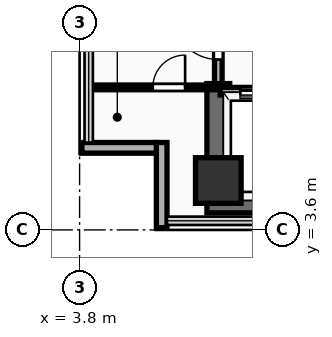
"""IFC4 building model, lengths in metres.
Left out: names, types, materials, properties, quantities, classifications, styles, units other than length and angle.
Written with IfcOpenShell. Run it as: python <this file> out.ifc"""

import sys

from ifc_helpers import new_model, si_unit, direction, frame, frame_2d, origin, origin_2d, place, context, subcontext, project, spatial, rectangle, extrude, element, fill, save


model = new_model("IFC4")
c1 = context("Model", 3, precision=1e-05, world=origin(), true_north=direction((0.0, 1.0)))
c2 = subcontext(c1, "Body", "Model", "MODEL_VIEW")
j1 = project(units=[si_unit("LENGTHUNIT", "METRE"), si_unit("PLANEANGLEUNIT", "RADIAN")], contexts=[c1])
p1 = place(None, origin())
s1 = spatial("IfcSite", under=j1, at=p1, CompositionType="ELEMENT")
p2 = place(p1, origin())
s2 = spatial("IfcBuilding", under=s1, at=p2, CompositionType="ELEMENT")
p3 = place(p2, frame((0.0, 0.0, 191.8)))
s3 = spatial("IfcBuildingStorey", under=s2, at=p3, CompositionType="ELEMENT", Elevation=191.8)
p4 = place(p3, frame((7.15, 4.35, 0.0), z_axis=(0.0, 0.0, 1.0), x_axis=(1.0, 0.0, 0.0)))
e1 = element("IfcWall", 1, at=p4, inside=s3, PredefinedType="SHEAR", context=c2, shape_type="SweptSolid", body=[
    extrude(rectangle(XDim=13.95, YDim=0.6, at=frame_2d((6.975, 0.0))), origin(), (0.0, 0.0, 1.0), 3.56),
])
p5 = place(p3, frame((7.45, 4.65, 0.0), z_axis=(0.0, 0.0, 1.0), x_axis=(0.0, 1.0, 0.0)))
e2 = element("IfcWall", 2, at=p5, inside=s3, PredefinedType="SHEAR", context=c2, shape_type="SweptSolid", body=[
    extrude(rectangle(XDim=2.8, YDim=0.6, at=frame_2d((1.4, 0.0))), origin(), (0.0, 0.0, 1.0), 3.56),
])
p6 = place(p3, frame((7.45, 4.9, 0.0), z_axis=(0.0, 0.0, 1.0), x_axis=(1.0, 0.0, 0.0)))
e3 = element("IfcColumn", 3, at=p6, inside=s3, PredefinedType="COLUMN", context=c2, shape_type="SweptSolid", body=[
    extrude(rectangle(XDim=1.2, YDim=1.2, at=origin_2d()), origin(), (0.0, 0.0, 1.0), 3.56),
])
p7 = place(p3, frame((5.96, 3.66, 0.0), z_axis=(0.0, 0.0, 1.0), x_axis=(0.0, 1.0, 0.0)))
e4 = element("IfcWall", 4, at=p7, inside=s3, PredefinedType="SOLIDWALL", context=c2, shape_type="SweptSolid", body=[
    extrude(rectangle(XDim=2.24, YDim=0.28, at=frame_2d((1.12, 0.0))), origin(), (0.0, 0.0, 1.0), 3.56),
])
p8 = place(p3, frame((3.86, 5.76, 0.0), z_axis=(0.0, 0.0, 1.0), x_axis=(1.0, 0.0, 0.0)))
e5 = element("IfcWall", 5, at=p8, inside=s3, PredefinedType="SOLIDWALL", context=c2, shape_type="SweptSolid", body=[
    extrude(rectangle(XDim=1.96, YDim=0.28, at=frame_2d((0.98, 0.0))), origin(), (0.0, 0.0, 1.0), 3.56),
])
p9 = place(p3, frame((7.5, 7.25, 0.0), z_axis=(0.0, 0.0, 1.0), x_axis=(1.0, 0.0, 0.0)))
e6 = element("IfcWall", 6, at=p9, inside=s3, PredefinedType="PARTITIONING", context=c2, shape_type="SweptSolid", body=[
    extrude(rectangle(XDim=8.35, YDim=0.2, at=frame_2d((4.175, 0.0))), origin(), (0.0, 0.0, 1.0), 3.56),
])
p10 = place(p9, frame((0.53, 0.0, 0.0)))
e7 = element("IfcOpeningElement", 7, at=p10, cuts=e6, PredefinedType="OPENING", context=c2, shape_type="SweptSolid", body=[
    extrude(rectangle(XDim=1.1, YDim=2.2, at=frame_2d((0.55, 1.1))), frame((0.0, 0.11, 0.0), z_axis=(0.0, -1.0, 0.0), x_axis=(1.0, 0.0, 0.0)), (0.0, 0.0, 1.0), 0.22),
])
p11 = place(p9, frame((2.37, 0.0, 0.0)))
e8 = element("IfcOpeningElement", 8, at=p11, cuts=e6, PredefinedType="OPENING", context=c2, shape_type="SweptSolid", body=[
    extrude(rectangle(XDim=1.1, YDim=2.2, at=frame_2d((0.55, 1.1))), frame((0.0, 0.11, 0.0), z_axis=(0.0, -1.0, 0.0), x_axis=(1.0, 0.0, 0.0)), (0.0, 0.0, 1.0), 0.22),
])
p12 = place(p9, frame((4.33, 0.0, 0.0)))
e9 = element("IfcOpeningElement", 9, at=p12, cuts=e6, PredefinedType="OPENING", context=c2, shape_type="SweptSolid", body=[
    extrude(rectangle(XDim=1.1, YDim=2.2, at=frame_2d((0.55, 1.1))), frame((0.0, 0.11, 0.0), z_axis=(0.0, -1.0, 0.0), x_axis=(1.0, 0.0, 0.0)), (0.0, 0.0, 1.0), 0.22),
])
p13 = place(p9, frame((6.5, 0.0, 0.0)))
e10 = element("IfcOpeningElement", 10, at=p13, cuts=e6, PredefinedType="OPENING", context=c2, shape_type="SweptSolid", body=[
    extrude(rectangle(XDim=1.1, YDim=2.2, at=frame_2d((0.55, 1.1))), frame((0.0, 0.11, 0.0), z_axis=(0.0, -1.0, 0.0), x_axis=(1.0, 0.0, 0.0)), (0.0, 0.0, 1.0), 0.22),
])
p14 = place(p3, frame((7.45, 7.45, 0.0), z_axis=(0.0, 0.0, 1.0), x_axis=(0.0, 1.0, 0.0)))
e11 = element("IfcWall", 11, at=p14, inside=s3, PredefinedType="PARTITIONING", context=c2, shape_type="SweptSolid", body=[
    extrude(rectangle(XDim=2.3, YDim=0.2, at=frame_2d((1.15, 0.0))), origin(), (0.0, 0.0, 1.0), 2.54),
])
p15 = place(p14, frame((0.633, 0.0, 0.0)))
e12 = element("IfcOpeningElement", 12, at=p15, cuts=e11, PredefinedType="OPENING", context=c2, shape_type="SweptSolid", body=[
    extrude(rectangle(XDim=1.2, YDim=2.25, at=frame_2d((0.6, 1.125))), frame((0.0, 0.11, 0.0), z_axis=(0.0, -1.0, 0.0), x_axis=(1.0, 0.0, 0.0)), (0.0, 0.0, 1.0), 0.22),
])
p16 = place(p3, frame((4.04, 7.35, 0.0), z_axis=(0.0, 0.0, 1.0), x_axis=(1.0, 0.0, 0.0)))
e13 = element("IfcWall", 13, at=p16, inside=s3, PredefinedType="PARTITIONING", context=c2, shape_type="SweptSolid", body=[
    extrude(rectangle(XDim=3.36, YDim=0.125, at=frame_2d((1.68, 0.0))), origin(), (0.0, 0.0, 1.0), 3.56),
])
p17 = place(p16, frame((1.687, 0.0, 0.0)))
e14 = element("IfcOpeningElement", 14, at=p17, cuts=e13, PredefinedType="OPENING", context=c2, shape_type="SweptSolid", body=[
    extrude(rectangle(XDim=0.85, YDim=2.15, at=frame_2d((0.425, 1.075))), frame((0.0, 0.073, 0.0), z_axis=(0.0, -1.0, 0.0), x_axis=(1.0, 0.0, 0.0)), (0.0, 0.0, 1.0), 0.145),
])
p18 = place(p10, origin())
e15 = element("IfcDoor", 15, at=p18, inside=s3, OperationType="SLIDING_TO_LEFT", PredefinedType="DOOR", context=c2, shape_type="SweptSolid", body=[
    extrude(rectangle(XDim=1.1, YDim=2.2, at=frame_2d((0.55, 1.1))), frame((0.0, 0.025, 0.0), z_axis=(0.0, -1.0, 0.0), x_axis=(1.0, 0.0, 0.0)), (0.0, 0.0, 1.0), 0.05),
])
fill(e7, e15)
p19 = place(p15, frame((1.2, 0.0, 0.0), z_axis=(0.0, 0.0, 1.0), x_axis=(-1.0, 0.0, 0.0)))
e16 = element("IfcDoor", 16, at=p19, inside=s3, OperationType="SINGLE_SWING_LEFT", PredefinedType="DOOR", context=c2, shape_type="SweptSolid", body=[
    extrude(rectangle(XDim=1.2, YDim=2.25, at=frame_2d((0.6, 1.125))), frame((0.0, 0.025, 0.0), z_axis=(0.0, -1.0, 0.0), x_axis=(1.0, 0.0, 0.0)), (0.0, 0.0, 1.0), 0.05),
])
fill(e12, e16)
p20 = place(p17, origin())
e17 = element("IfcDoor", 17, at=p20, inside=s3, OperationType="SINGLE_SWING_RIGHT", PredefinedType="DOOR", context=c2, shape_type="SweptSolid", body=[
    extrude(rectangle(XDim=0.85, YDim=2.15, at=frame_2d((0.425, 1.075))), frame((0.0, 0.025, 0.0), z_axis=(0.0, -1.0, 0.0), x_axis=(1.0, 0.0, 0.0)), (0.0, 0.0, 1.0), 0.05),
])
fill(e14, e17)
save(model, sys.argv[1])
